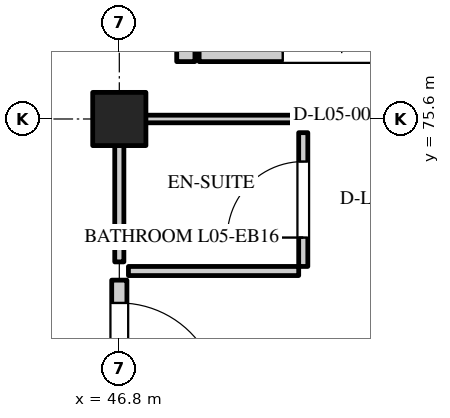
"""IFC4 building model, lengths in metres.
Left out: names, types, materials, properties, quantities, classifications, styles, units other than length and angle.
Written with IfcOpenShell. Run it as: python <this file> out.ifc"""

import sys

from ifc_helpers import new_model, si_unit, direction, frame, frame_2d, origin, origin_2d, place, context, subcontext, project, spatial, rectangle, extrude, element, fill, save


model = new_model("IFC4")
c1 = context("Model", 3, precision=1e-05, world=origin(), true_north=direction((0.0, 1.0)))
c2 = subcontext(c1, "Body", "Model", "MODEL_VIEW")
j1 = project(units=[si_unit("LENGTHUNIT", "METRE"), si_unit("PLANEANGLEUNIT", "RADIAN")], contexts=[c1])
p1 = place(None, origin())
s1 = spatial("IfcSite", under=j1, at=p1, CompositionType="ELEMENT")
p2 = place(p1, origin())
s2 = spatial("IfcBuilding", under=s1, at=p2, CompositionType="ELEMENT")
p3 = place(p2, frame((0.0, 0.0, 22.2)))
s3 = spatial("IfcBuildingStorey", under=s2, at=p3, CompositionType="ELEMENT", Elevation=22.2)
p4 = place(p3, frame((46.8, 75.6, 0.0), z_axis=(0.0, 0.0, 1.0), x_axis=(1.0, 0.0, 0.0)))
e1 = element("IfcColumn", 1, at=p4, inside=s3, PredefinedType="COLUMN", context=c2, shape_type="SweptSolid", body=[
    extrude(rectangle(XDim=0.7, YDim=0.7, at=origin_2d()), origin(), (0.0, 0.0, 1.0), 3.9),
])
p5 = place(p3, frame((47.675, 76.355, 0.0), z_axis=(0.0, 0.0, 1.0), x_axis=(0.0, 1.0, 0.0)))
e2 = element("IfcWall", 2, at=p5, inside=s3, PredefinedType="STANDARD", context=c2, shape_type="SweptSolid", body=[
    extrude(rectangle(XDim=2.695, YDim=0.24, at=frame_2d((1.348, 0.0))), origin(), (0.0, 0.0, 1.0), 3.6),
])
p6 = place(p3, frame((47.85, 76.475, 0.0), z_axis=(0.0, 0.0, 1.0), x_axis=(1.0, 0.0, 0.0)))
e3 = element("IfcWall", 3, at=p6, inside=s3, PredefinedType="STANDARD", context=c2, shape_type="SweptSolid", body=[
    extrude(rectangle(XDim=3.75, YDim=0.24, at=frame_2d((1.875, 0.0))), origin(), (0.0, 0.0, 1.0), 3.6),
])
p7 = place(p6, frame((1.1, 0.0, 0.0)))
e4 = element("IfcOpeningElement", 4, at=p7, cuts=e3, PredefinedType="OPENING", context=c2, shape_type="SweptSolid", body=[
    extrude(rectangle(XDim=1.55, YDim=2.25, at=frame_2d((0.775, 1.125))), frame((0.0, 0.132, 0.0), z_axis=(0.0, -1.0, 0.0), x_axis=(1.0, 0.0, 0.0)), (0.0, 0.0, 1.0), 0.264),
])
p8 = place(p3, frame((46.92, 75.6, 0.0), z_axis=(0.0, 0.0, 1.0), x_axis=(1.0, 0.0, 0.0)))
e5 = element("IfcWall", 5, at=p8, inside=s3, PredefinedType="PARTITIONING", context=c2, shape_type="SweptSolid", body=[
    extrude(rectangle(XDim=7.56, YDim=0.1, at=frame_2d((3.78, 0.0))), origin(), (0.0, 0.0, 1.0), 2.95),
])
p9 = place(p3, frame((46.8, 71.52, 0.0), z_axis=(0.0, 0.0, 1.0), x_axis=(0.0, 1.0, 0.0)))
e6 = element("IfcWall", 6, at=p9, inside=s3, PredefinedType="STANDARD", context=c2, shape_type="SweptSolid", body=[
    extrude(rectangle(XDim=1.96, YDim=0.2, at=frame_2d((0.98, 0.0))), origin(), (0.0, 0.0, 1.0), 3.58),
])
p10 = place(p9, frame((0.34, 0.0, 0.0)))
e7 = element("IfcOpeningElement", 7, at=p10, cuts=e6, PredefinedType="OPENING", context=c2, shape_type="SweptSolid", body=[
    extrude(rectangle(XDim=1.32, YDim=2.2, at=frame_2d((0.66, 1.1))), frame((0.0, 0.112, 0.0), z_axis=(0.0, -1.0, 0.0), x_axis=(1.0, 0.0, 0.0)), (0.0, 0.0, 1.0), 0.224),
])
p11 = place(p3, frame((46.8, 73.72, 0.0), z_axis=(0.0, 0.0, 1.0), x_axis=(0.0, 1.0, 0.0)))
e8 = element("IfcWall", 8, at=p11, inside=s3, PredefinedType="PARTITIONING", context=c2, shape_type="SweptSolid", body=[
    extrude(rectangle(XDim=1.76, YDim=0.12, at=frame_2d((0.88, 0.0))), origin(), (0.0, 0.0, 1.0), 3.58),
])
p12 = place(p3, frame((46.92, 73.6, 0.0), z_axis=(0.0, 0.0, 1.0), x_axis=(1.0, 0.0, 0.0)))
e9 = element("IfcWall", 9, at=p12, inside=s3, PredefinedType="PARTITIONING", context=c2, shape_type="SweptSolid", body=[
    extrude(rectangle(XDim=2.24, YDim=0.12, at=frame_2d((1.12, 0.0))), origin(), (0.0, 0.0, 1.0), 3.58),
])
p13 = place(p3, frame((49.22, 73.66, 0.0), z_axis=(0.0, 0.0, 1.0), x_axis=(0.0, 1.0, 0.0)))
e10 = element("IfcWall", 10, at=p13, inside=s3, PredefinedType="PARTITIONING", context=c2, shape_type="SweptSolid", body=[
    extrude(rectangle(XDim=1.76, YDim=0.12, at=frame_2d((0.88, 0.0))), origin(), (0.0, 0.0, 1.0), 3.58),
])
p14 = place(p13, frame((0.38, 0.0, 0.0)))
e11 = element("IfcOpeningElement", 11, at=p14, cuts=e10, PredefinedType="OPENING", context=c2, shape_type="SweptSolid", body=[
    extrude(rectangle(XDim=1.0, YDim=2.1, at=frame_2d((0.5, 1.05))), frame((0.0, 0.072, 0.0), z_axis=(0.0, -1.0, 0.0), x_axis=(1.0, 0.0, 0.0)), (0.0, 0.0, 1.0), 0.144),
])
p15 = place(p7, origin())
e12 = element("IfcDoor", 12, at=p15, inside=s3, OperationType="DOUBLE_DOOR_SINGLE_SWING", PredefinedType="DOOR", context=c2, shape_type="SweptSolid", body=[
    extrude(rectangle(XDim=1.55, YDim=2.25, at=frame_2d((0.775, 1.125))), frame((0.0, 0.025, 0.0), z_axis=(0.0, -1.0, 0.0), x_axis=(1.0, 0.0, 0.0)), (0.0, 0.0, 1.0), 0.05),
])
fill(e4, e12)
p16 = place(p10, frame((1.32, 0.0, 0.0), z_axis=(0.0, 0.0, 1.0), x_axis=(-1.0, 0.0, 0.0)))
e13 = element("IfcDoor", 13, at=p16, inside=s3, OperationType="SINGLE_SWING_RIGHT", PredefinedType="DOOR", context=c2, shape_type="SweptSolid", body=[
    extrude(rectangle(XDim=1.32, YDim=2.2, at=frame_2d((0.66, 1.1))), frame((0.0, 0.025, 0.0), z_axis=(0.0, -1.0, 0.0), x_axis=(1.0, 0.0, 0.0)), (0.0, 0.0, 1.0), 0.05),
])
fill(e7, e13)
p17 = place(p14, origin())
e14 = element("IfcDoor", 14, at=p17, inside=s3, OperationType="SINGLE_SWING_LEFT", PredefinedType="DOOR", context=c2, shape_type="SweptSolid", body=[
    extrude(rectangle(XDim=1.0, YDim=2.1, at=frame_2d((0.5, 1.05))), frame((0.0, 0.025, 0.0), z_axis=(0.0, -1.0, 0.0), x_axis=(1.0, 0.0, 0.0)), (0.0, 0.0, 1.0), 0.05),
])
fill(e11, e14)
save(model, sys.argv[1])
